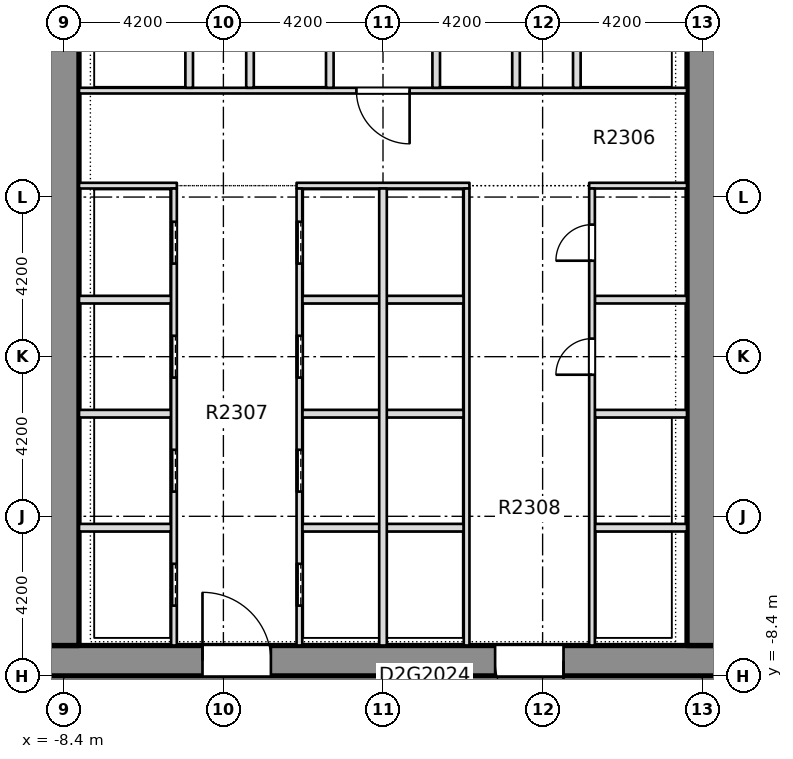
"""IFC4 building model, lengths in metres.
Left out: names, types, materials, properties, quantities, classifications, styles, units other than length and angle.
Written with IfcOpenShell. Run it as: python <this file> out.ifc"""

import sys

from ifc_helpers import new_model, si_unit, direction, frame, frame_2d, origin, place, context, subcontext, project, spatial, rectangle, extrude, element, fill, save


model = new_model("IFC4")
c1 = context("Model", 3, precision=1e-05, world=origin(), true_north=direction((0.0, 1.0)))
c2 = subcontext(c1, "Body", "Model", "MODEL_VIEW")
j1 = project(units=[si_unit("LENGTHUNIT", "METRE"), si_unit("PLANEANGLEUNIT", "RADIAN")], contexts=[c1])
p1 = place(None, origin())
s1 = spatial("IfcSite", under=j1, at=p1, CompositionType="ELEMENT")
p2 = place(p1, origin())
s2 = spatial("IfcBuilding", under=s1, at=p2, CompositionType="ELEMENT")
p3 = place(p2, frame((0.0, 0.0, 94.2)))
s3 = spatial("IfcBuildingStorey", under=s2, at=p3, CompositionType="ELEMENT", Elevation=94.2)
p4 = place(p3, frame((-11.8, -8.0, -0.32), z_axis=(0.0, 0.0, 1.0), x_axis=(1.0, 0.0, 0.0)))
e1 = element("IfcWall", 1, at=p4, inside=s3, PredefinedType="SHEAR", context=c2, shape_type="SweptSolid", body=[
    extrude(rectangle(XDim=23.6, YDim=0.8, at=frame_2d((11.8, 0.0))), origin(), (0.0, 0.0, 1.0), 3.45),
])
p5 = place(p4, frame((7.05, 0.0, 0.32)))
e2 = element("IfcOpeningElement", 2, at=p5, cuts=e1, PredefinedType="OPENING", context=c2, shape_type="SweptSolid", body=[
    extrude(rectangle(XDim=1.8, YDim=2.1, at=frame_2d((0.9, 1.05))), frame((0.0, 0.41, 0.0), z_axis=(0.0, -1.0, 0.0), x_axis=(1.0, 0.0, 0.0)), (0.0, 0.0, 1.0), 0.82),
])
p6 = place(p4, frame((14.75, 0.0, 0.32)))
e3 = element("IfcOpeningElement", 3, at=p6, cuts=e1, PredefinedType="OPENING", context=c2, shape_type="SweptSolid", body=[
    extrude(rectangle(XDim=1.8, YDim=2.1, at=frame_2d((0.9, 1.05))), frame((0.0, 0.41, 0.0), z_axis=(0.0, -1.0, 0.0), x_axis=(1.0, 0.0, 0.0)), (0.0, 0.0, 1.0), 0.82),
])
p7 = place(p3, frame((-8.4, -7.6, -0.32), z_axis=(0.0, 0.0, 1.0), x_axis=(0.0, 1.0, 0.0)))
e4 = element("IfcWall", 4, at=p7, inside=s3, PredefinedType="SHEAR", context=c2, shape_type="SweptSolid", body=[
    extrude(rectangle(XDim=28.55, YDim=0.8, at=frame_2d((14.275, 0.0))), origin(), (0.0, 0.0, 1.0), 3.45),
])
p8 = place(p7, frame((18.5, 0.0, 0.32)))
e5 = element("IfcOpeningElement", 5, at=p8, cuts=e4, PredefinedType="OPENING", context=c2, shape_type="SweptSolid", body=[
    extrude(rectangle(XDim=1.2, YDim=2.1, at=frame_2d((0.6, 1.05))), frame((0.0, 0.41, 0.0), z_axis=(0.0, -1.0, 0.0), x_axis=(1.0, 0.0, 0.0)), (0.0, 0.0, 1.0), 0.82),
])
p9 = place(p3, frame((8.4, -7.6, -0.32), z_axis=(0.0, 0.0, 1.0), x_axis=(0.0, 1.0, 0.0)))
e6 = element("IfcWall", 6, at=p9, inside=s3, PredefinedType="SHEAR", context=c2, shape_type="SweptSolid", body=[
    extrude(rectangle(XDim=28.55, YDim=0.8, at=frame_2d((14.275, 0.0))), origin(), (0.0, 0.0, 1.0), 3.45),
])
p10 = place(p9, frame((18.5, 0.0, 0.32)))
e7 = element("IfcOpeningElement", 7, at=p10, cuts=e6, PredefinedType="OPENING", context=c2, shape_type="SweptSolid", body=[
    extrude(rectangle(XDim=1.2, YDim=2.1, at=frame_2d((0.6, 1.05))), frame((0.0, 0.41, 0.0), z_axis=(0.0, -1.0, 0.0), x_axis=(1.0, 0.0, 0.0)), (0.0, 0.0, 1.0), 0.82),
])
p11 = place(p3, frame((-7.999, -4.5, 0.0), z_axis=(0.0, 0.0, 1.0), x_axis=(1.0, 0.0, 0.0)))
e8 = element("IfcWall", 8, at=p11, inside=s3, PredefinedType="PARTITIONING", context=c2, shape_type="SweptSolid", body=[
    extrude(rectangle(XDim=2.424, YDim=0.2, at=frame_2d((1.212, 0.0))), origin(), (0.0, 0.0, 1.0), 3.13),
])
p12 = place(p3, frame((-2.125, -4.5, 0.0), z_axis=(0.0, 0.0, 1.0), x_axis=(1.0, 0.0, 0.0)))
e9 = element("IfcWall", 9, at=p12, inside=s3, PredefinedType="PARTITIONING", context=c2, shape_type="SweptSolid", body=[
    extrude(rectangle(XDim=4.25, YDim=0.2, at=frame_2d((2.125, 0.0))), origin(), (0.0, 0.0, 1.0), 3.13),
])
for number, where, z_axis, x_axis in (
    (10, (5.575, -4.5, 0.0), (0.0, 0.0, 1.0), (1.0, 0.0, 0.0)),
    (11, (-7.999, -1.5, 0.0), (0.0, 0.0, 1.0), (1.0, 0.0, 0.0)),
):
    element("IfcWall", number, at=place(p3, frame(where, z_axis=z_axis, x_axis=x_axis)), inside=s3, PredefinedType="PARTITIONING", context=c2, shape_type="SweptSolid", body=[
        extrude(rectangle(XDim=2.424, YDim=0.2, at=frame_2d((1.212, 0.0))), origin(), (0.0, 0.0, 1.0), 3.13),
    ])
p13 = place(p3, frame((-2.125, -1.5, 0.0), z_axis=(0.0, 0.0, 1.0), x_axis=(1.0, 0.0, 0.0)))
e12 = element("IfcWall", 12, at=p13, inside=s3, PredefinedType="PARTITIONING", context=c2, shape_type="SweptSolid", body=[
    extrude(rectangle(XDim=4.25, YDim=0.2, at=frame_2d((2.125, 0.0))), origin(), (0.0, 0.0, 1.0), 3.13),
])
for number, where, z_axis, x_axis in (
    (13, (5.575, -1.5, 0.0), (0.0, 0.0, 1.0), (1.0, 0.0, 0.0)),
    (14, (-7.999, 1.5, 0.0), (0.0, 0.0, 1.0), (1.0, 0.0, 0.0)),
):
    element("IfcWall", number, at=place(p3, frame(where, z_axis=z_axis, x_axis=x_axis)), inside=s3, PredefinedType="PARTITIONING", context=c2, shape_type="SweptSolid", body=[
        extrude(rectangle(XDim=2.424, YDim=0.2, at=frame_2d((1.212, 0.0))), origin(), (0.0, 0.0, 1.0), 3.13),
    ])
p14 = place(p3, frame((-2.125, 1.5, 0.0), z_axis=(0.0, 0.0, 1.0), x_axis=(1.0, 0.0, 0.0)))
e15 = element("IfcWall", 15, at=p14, inside=s3, PredefinedType="PARTITIONING", context=c2, shape_type="SweptSolid", body=[
    extrude(rectangle(XDim=4.25, YDim=0.2, at=frame_2d((2.125, 0.0))), origin(), (0.0, 0.0, 1.0), 3.13),
])
p15 = place(p3, frame((5.575, 1.5, 0.0), z_axis=(0.0, 0.0, 1.0), x_axis=(1.0, 0.0, 0.0)))
e16 = element("IfcWall", 16, at=p15, inside=s3, PredefinedType="PARTITIONING", context=c2, shape_type="SweptSolid", body=[
    extrude(rectangle(XDim=2.424, YDim=0.2, at=frame_2d((1.212, 0.0))), origin(), (0.0, 0.0, 1.0), 3.13),
])
p16 = place(p3, frame((-7.999, 4.5, 0.0), z_axis=(0.0, 0.0, 1.0), x_axis=(1.0, 0.0, 0.0)))
e17 = element("IfcWall", 17, at=p16, inside=s3, PredefinedType="PARTITIONING", context=c2, shape_type="SweptSolid", body=[
    extrude(rectangle(XDim=2.574, YDim=0.15, at=frame_2d((1.287, 0.0))), origin(), (0.0, 0.0, 1.0), 3.13),
])
p17 = place(p3, frame((-2.275, 4.5, 0.0), z_axis=(0.0, 0.0, 1.0), x_axis=(1.0, 0.0, 0.0)))
e18 = element("IfcWall", 18, at=p17, inside=s3, PredefinedType="PARTITIONING", context=c2, shape_type="SweptSolid", body=[
    extrude(rectangle(XDim=4.55, YDim=0.15, at=frame_2d((2.275, 0.0))), origin(), (0.0, 0.0, 1.0), 3.13),
])
p18 = place(p3, frame((5.425, 4.5, 0.0), z_axis=(0.0, 0.0, 1.0), x_axis=(1.0, 0.0, 0.0)))
e19 = element("IfcWall", 19, at=p18, inside=s3, PredefinedType="PARTITIONING", context=c2, shape_type="SweptSolid", body=[
    extrude(rectangle(XDim=2.574, YDim=0.15, at=frame_2d((1.287, 0.0))), origin(), (0.0, 0.0, 1.0), 3.13),
])
p19 = place(p3, frame((-7.999, 7.0, 0.0), z_axis=(0.0, 0.0, 1.0), x_axis=(1.0, 0.0, 0.0)))
e20 = element("IfcWall", 20, at=p19, inside=s3, PredefinedType="PARTITIONING", context=c2, shape_type="SweptSolid", body=[
    extrude(rectangle(XDim=15.998, YDim=0.15, at=frame_2d((7.999, 0.0))), origin(), (0.0, 0.0, 1.0), 3.13),
])
p20 = place(p19, frame((7.299, 0.0, 0.0)))
e21 = element("IfcOpeningElement", 21, at=p20, cuts=e20, PredefinedType="OPENING", context=c2, shape_type="SweptSolid", body=[
    extrude(rectangle(XDim=1.4, YDim=2.1, at=frame_2d((0.7, 1.05))), frame((0.0, 0.085, 0.0), z_axis=(0.0, -1.0, 0.0), x_axis=(1.0, 0.0, 0.0)), (0.0, 0.0, 1.0), 0.17),
])
p21 = place(p3, frame((-5.5, -7.599, 0.0), z_axis=(0.0, 0.0, 1.0), x_axis=(0.0, 1.0, 0.0)))
e22 = element("IfcWall", 22, at=p21, inside=s3, PredefinedType="PARTITIONING", context=c2, shape_type="SweptSolid", body=[
    extrude(rectangle(XDim=12.024, YDim=0.15, at=frame_2d((6.012, 0.0))), origin(), (0.0, 0.0, 1.0), 3.13),
])
p22 = place(p21, frame((1.049, 0.0, 0.0)))
e23 = element("IfcOpeningElement", 23, at=p22, cuts=e22, PredefinedType="OPENING", context=c2, shape_type="SweptSolid", body=[
    extrude(rectangle(XDim=1.1, YDim=2.1, at=frame_2d((0.55, 1.05))), frame((0.0, 0.085, 0.0), z_axis=(0.0, -1.0, 0.0), x_axis=(1.0, 0.0, 0.0)), (0.0, 0.0, 1.0), 0.17),
])
p23 = place(p21, frame((4.049, 0.0, 0.0)))
e24 = element("IfcOpeningElement", 24, at=p23, cuts=e22, PredefinedType="OPENING", context=c2, shape_type="SweptSolid", body=[
    extrude(rectangle(XDim=1.1, YDim=2.1, at=frame_2d((0.55, 1.05))), frame((0.0, 0.085, 0.0), z_axis=(0.0, -1.0, 0.0), x_axis=(1.0, 0.0, 0.0)), (0.0, 0.0, 1.0), 0.17),
])
p24 = place(p21, frame((7.049, 0.0, 0.0)))
e25 = element("IfcOpeningElement", 25, at=p24, cuts=e22, PredefinedType="OPENING", context=c2, shape_type="SweptSolid", body=[
    extrude(rectangle(XDim=1.1, YDim=2.1, at=frame_2d((0.55, 1.05))), frame((0.0, 0.085, 0.0), z_axis=(0.0, -1.0, 0.0), x_axis=(1.0, 0.0, 0.0)), (0.0, 0.0, 1.0), 0.17),
])
p25 = place(p21, frame((10.049, 0.0, 0.0)))
e26 = element("IfcOpeningElement", 26, at=p25, cuts=e22, PredefinedType="OPENING", context=c2, shape_type="SweptSolid", body=[
    extrude(rectangle(XDim=1.1, YDim=2.1, at=frame_2d((0.55, 1.05))), frame((0.0, 0.085, 0.0), z_axis=(0.0, -1.0, 0.0), x_axis=(1.0, 0.0, 0.0)), (0.0, 0.0, 1.0), 0.17),
])
p26 = place(p3, frame((-5.1, 7.075, 0.0), z_axis=(0.0, 0.0, 1.0), x_axis=(0.0, 1.0, 0.0)))
e27 = element("IfcWall", 27, at=p26, inside=s3, PredefinedType="PARTITIONING", context=c2, shape_type="SweptSolid", body=[
    extrude(rectangle(XDim=2.725, YDim=0.2, at=frame_2d((1.363, 0.0))), origin(), (0.0, 0.0, 1.0), 3.13),
])
p27 = place(p3, frame((-3.5, 7.075, 0.0), z_axis=(0.0, 0.0, 1.0), x_axis=(0.0, 1.0, 0.0)))
e28 = element("IfcWall", 28, at=p27, inside=s3, PredefinedType="PARTITIONING", context=c2, shape_type="SweptSolid", body=[
    extrude(rectangle(XDim=2.85, YDim=0.2, at=frame_2d((1.425, 0.0))), origin(), (0.0, 0.0, 1.0), 3.13),
])
p28 = place(p3, frame((-2.2, -7.599, 0.0), z_axis=(0.0, 0.0, 1.0), x_axis=(0.0, 1.0, 0.0)))
e29 = element("IfcWall", 29, at=p28, inside=s3, PredefinedType="PARTITIONING", context=c2, shape_type="SweptSolid", body=[
    extrude(rectangle(XDim=12.024, YDim=0.15, at=frame_2d((6.012, 0.0))), origin(), (0.0, 0.0, 1.0), 3.13),
])
p29 = place(p28, frame((1.049, 0.0, 0.0)))
e30 = element("IfcOpeningElement", 30, at=p29, cuts=e29, PredefinedType="OPENING", context=c2, shape_type="SweptSolid", body=[
    extrude(rectangle(XDim=1.1, YDim=2.1, at=frame_2d((0.55, 1.05))), frame((0.0, 0.085, 0.0), z_axis=(0.0, -1.0, 0.0), x_axis=(1.0, 0.0, 0.0)), (0.0, 0.0, 1.0), 0.17),
])
p30 = place(p28, frame((4.049, 0.0, 0.0)))
e31 = element("IfcOpeningElement", 31, at=p30, cuts=e29, PredefinedType="OPENING", context=c2, shape_type="SweptSolid", body=[
    extrude(rectangle(XDim=1.1, YDim=2.1, at=frame_2d((0.55, 1.05))), frame((0.0, 0.085, 0.0), z_axis=(0.0, -1.0, 0.0), x_axis=(1.0, 0.0, 0.0)), (0.0, 0.0, 1.0), 0.17),
])
p31 = place(p28, frame((7.049, 0.0, 0.0)))
e32 = element("IfcOpeningElement", 32, at=p31, cuts=e29, PredefinedType="OPENING", context=c2, shape_type="SweptSolid", body=[
    extrude(rectangle(XDim=1.1, YDim=2.1, at=frame_2d((0.55, 1.05))), frame((0.0, 0.085, 0.0), z_axis=(0.0, -1.0, 0.0), x_axis=(1.0, 0.0, 0.0)), (0.0, 0.0, 1.0), 0.17),
])
p32 = place(p28, frame((10.049, 0.0, 0.0)))
e33 = element("IfcOpeningElement", 33, at=p32, cuts=e29, PredefinedType="OPENING", context=c2, shape_type="SweptSolid", body=[
    extrude(rectangle(XDim=1.1, YDim=2.1, at=frame_2d((0.55, 1.05))), frame((0.0, 0.085, 0.0), z_axis=(0.0, -1.0, 0.0), x_axis=(1.0, 0.0, 0.0)), (0.0, 0.0, 1.0), 0.17),
])
p33 = place(p3, frame((-1.4, 7.075, 0.0), z_axis=(0.0, 0.0, 1.0), x_axis=(0.0, 1.0, 0.0)))
e34 = element("IfcWall", 34, at=p33, inside=s3, PredefinedType="PARTITIONING", context=c2, shape_type="SweptSolid", body=[
    extrude(rectangle(XDim=2.85, YDim=0.2, at=frame_2d((1.425, 0.0))), origin(), (0.0, 0.0, 1.0), 3.13),
])
p34 = place(p3, frame((0.0, -7.599, 0.0), z_axis=(0.0, 0.0, 1.0), x_axis=(0.0, 1.0, 0.0)))
e35 = element("IfcWall", 35, at=p34, inside=s3, PredefinedType="PARTITIONING", context=c2, shape_type="SweptSolid", body=[
    extrude(rectangle(XDim=12.024, YDim=0.2, at=frame_2d((6.012, 0.0))), origin(), (0.0, 0.0, 1.0), 3.13),
])
p35 = place(p3, frame((1.4, 7.075, 0.0), z_axis=(0.0, 0.0, 1.0), x_axis=(0.0, 1.0, 0.0)))
e36 = element("IfcWall", 36, at=p35, inside=s3, PredefinedType="PARTITIONING", context=c2, shape_type="SweptSolid", body=[
    extrude(rectangle(XDim=2.85, YDim=0.2, at=frame_2d((1.425, 0.0))), origin(), (0.0, 0.0, 1.0), 3.13),
])
p36 = place(p3, frame((2.2, -7.599, 0.0), z_axis=(0.0, 0.0, 1.0), x_axis=(0.0, 1.0, 0.0)))
e37 = element("IfcWall", 37, at=p36, inside=s3, PredefinedType="PARTITIONING", context=c2, shape_type="SweptSolid", body=[
    extrude(rectangle(XDim=12.024, YDim=0.15, at=frame_2d((6.012, 0.0))), origin(), (0.0, 0.0, 1.0), 3.13),
])
p37 = place(p3, frame((3.5, 7.075, 0.0), z_axis=(0.0, 0.0, 1.0), x_axis=(0.0, 1.0, 0.0)))
e38 = element("IfcWall", 38, at=p37, inside=s3, PredefinedType="PARTITIONING", context=c2, shape_type="SweptSolid", body=[
    extrude(rectangle(XDim=2.85, YDim=0.2, at=frame_2d((1.425, 0.0))), origin(), (0.0, 0.0, 1.0), 3.13),
])
p38 = place(p3, frame((5.1, 7.075, 0.0), z_axis=(0.0, 0.0, 1.0), x_axis=(0.0, 1.0, 0.0)))
e39 = element("IfcWall", 39, at=p38, inside=s3, PredefinedType="PARTITIONING", context=c2, shape_type="SweptSolid", body=[
    extrude(rectangle(XDim=2.725, YDim=0.2, at=frame_2d((1.363, 0.0))), origin(), (0.0, 0.0, 1.0), 3.13),
])
p39 = place(p3, frame((5.5, -7.599, 0.0), z_axis=(0.0, 0.0, 1.0), x_axis=(0.0, 1.0, 0.0)))
e40 = element("IfcWall", 40, at=p39, inside=s3, PredefinedType="PARTITIONING", context=c2, shape_type="SweptSolid", body=[
    extrude(rectangle(XDim=12.024, YDim=0.15, at=frame_2d((6.012, 0.0))), origin(), (0.0, 0.0, 1.0), 3.13),
])
p40 = place(p39, frame((7.124, 0.0, 0.0)))
e41 = element("IfcOpeningElement", 41, at=p40, cuts=e40, PredefinedType="OPENING", context=c2, shape_type="SweptSolid", body=[
    extrude(rectangle(XDim=0.95, YDim=2.1, at=frame_2d((0.475, 1.05))), frame((0.0, 0.085, 0.0), z_axis=(0.0, -1.0, 0.0), x_axis=(1.0, 0.0, 0.0)), (0.0, 0.0, 1.0), 0.17),
])
p41 = place(p39, frame((10.124, 0.0, 0.0)))
e42 = element("IfcOpeningElement", 42, at=p41, cuts=e40, PredefinedType="OPENING", context=c2, shape_type="SweptSolid", body=[
    extrude(rectangle(XDim=0.95, YDim=2.1, at=frame_2d((0.475, 1.05))), frame((0.0, 0.085, 0.0), z_axis=(0.0, -1.0, 0.0), x_axis=(1.0, 0.0, 0.0)), (0.0, 0.0, 1.0), 0.17),
])
p42 = place(p22, origin())
e43 = element("IfcDoor", 43, at=p42, inside=s3, OperationType="SLIDING_TO_LEFT", PredefinedType="DOOR", context=c2, shape_type="SweptSolid", body=[
    extrude(rectangle(XDim=1.1, YDim=2.1, at=frame_2d((0.55, 1.05))), frame((0.0, 0.025, 0.0), z_axis=(0.0, -1.0, 0.0), x_axis=(1.0, 0.0, 0.0)), (0.0, 0.0, 1.0), 0.05),
])
fill(e23, e43)
p43 = place(p23, origin())
e44 = element("IfcDoor", 44, at=p43, inside=s3, OperationType="SLIDING_TO_LEFT", PredefinedType="DOOR", context=c2, shape_type="SweptSolid", body=[
    extrude(rectangle(XDim=1.1, YDim=2.1, at=frame_2d((0.55, 1.05))), frame((0.0, 0.025, 0.0), z_axis=(0.0, -1.0, 0.0), x_axis=(1.0, 0.0, 0.0)), (0.0, 0.0, 1.0), 0.05),
])
fill(e24, e44)
p44 = place(p24, origin())
e45 = element("IfcDoor", 45, at=p44, inside=s3, OperationType="SLIDING_TO_LEFT", PredefinedType="DOOR", context=c2, shape_type="SweptSolid", body=[
    extrude(rectangle(XDim=1.1, YDim=2.1, at=frame_2d((0.55, 1.05))), frame((0.0, 0.025, 0.0), z_axis=(0.0, -1.0, 0.0), x_axis=(1.0, 0.0, 0.0)), (0.0, 0.0, 1.0), 0.05),
])
fill(e25, e45)
p45 = place(p25, origin())
e46 = element("IfcDoor", 46, at=p45, inside=s3, OperationType="SLIDING_TO_LEFT", PredefinedType="DOOR", context=c2, shape_type="SweptSolid", body=[
    extrude(rectangle(XDim=1.1, YDim=2.1, at=frame_2d((0.55, 1.05))), frame((0.0, 0.025, 0.0), z_axis=(0.0, -1.0, 0.0), x_axis=(1.0, 0.0, 0.0)), (0.0, 0.0, 1.0), 0.05),
])
fill(e26, e46)
p46 = place(p29, origin())
e47 = element("IfcDoor", 47, at=p46, inside=s3, OperationType="SLIDING_TO_LEFT", PredefinedType="DOOR", context=c2, shape_type="SweptSolid", body=[
    extrude(rectangle(XDim=1.1, YDim=2.1, at=frame_2d((0.55, 1.05))), frame((0.0, 0.025, 0.0), z_axis=(0.0, -1.0, 0.0), x_axis=(1.0, 0.0, 0.0)), (0.0, 0.0, 1.0), 0.05),
])
fill(e30, e47)
p47 = place(p30, origin())
e48 = element("IfcDoor", 48, at=p47, inside=s3, OperationType="SLIDING_TO_LEFT", PredefinedType="DOOR", context=c2, shape_type="SweptSolid", body=[
    extrude(rectangle(XDim=1.1, YDim=2.1, at=frame_2d((0.55, 1.05))), frame((0.0, 0.025, 0.0), z_axis=(0.0, -1.0, 0.0), x_axis=(1.0, 0.0, 0.0)), (0.0, 0.0, 1.0), 0.05),
])
fill(e31, e48)
p48 = place(p31, origin())
e49 = element("IfcDoor", 49, at=p48, inside=s3, OperationType="SLIDING_TO_LEFT", PredefinedType="DOOR", context=c2, shape_type="SweptSolid", body=[
    extrude(rectangle(XDim=1.1, YDim=2.1, at=frame_2d((0.55, 1.05))), frame((0.0, 0.025, 0.0), z_axis=(0.0, -1.0, 0.0), x_axis=(1.0, 0.0, 0.0)), (0.0, 0.0, 1.0), 0.05),
])
fill(e32, e49)
p49 = place(p32, origin())
e50 = element("IfcDoor", 50, at=p49, inside=s3, OperationType="SLIDING_TO_LEFT", PredefinedType="DOOR", context=c2, shape_type="SweptSolid", body=[
    extrude(rectangle(XDim=1.1, YDim=2.1, at=frame_2d((0.55, 1.05))), frame((0.0, 0.025, 0.0), z_axis=(0.0, -1.0, 0.0), x_axis=(1.0, 0.0, 0.0)), (0.0, 0.0, 1.0), 0.05),
])
fill(e33, e50)
p50 = place(p40, origin())
e51 = element("IfcDoor", 51, at=p50, inside=s3, OperationType="SINGLE_SWING_RIGHT", PredefinedType="DOOR", context=c2, shape_type="SweptSolid", body=[
    extrude(rectangle(XDim=0.95, YDim=2.1, at=frame_2d((0.475, 1.05))), frame((0.0, 0.025, 0.0), z_axis=(0.0, -1.0, 0.0), x_axis=(1.0, 0.0, 0.0)), (0.0, 0.0, 1.0), 0.05),
])
fill(e41, e51)
p51 = place(p41, origin())
e52 = element("IfcDoor", 52, at=p51, inside=s3, OperationType="SINGLE_SWING_RIGHT", PredefinedType="DOOR", context=c2, shape_type="SweptSolid", body=[
    extrude(rectangle(XDim=0.95, YDim=2.1, at=frame_2d((0.475, 1.05))), frame((0.0, 0.025, 0.0), z_axis=(0.0, -1.0, 0.0), x_axis=(1.0, 0.0, 0.0)), (0.0, 0.0, 1.0), 0.05),
])
fill(e42, e52)
p52 = place(p20, origin())
e53 = element("IfcDoor", 53, at=p52, inside=s3, OperationType="SINGLE_SWING_RIGHT", PredefinedType="DOOR", context=c2, shape_type="SweptSolid", body=[
    extrude(rectangle(XDim=1.4, YDim=2.1, at=frame_2d((0.7, 1.05))), frame((0.0, 0.025, 0.0), z_axis=(0.0, -1.0, 0.0), x_axis=(1.0, 0.0, 0.0)), (0.0, 0.0, 1.0), 0.05),
])
fill(e21, e53)
p53 = place(p5, origin())
e54 = element("IfcDoor", 54, at=p53, inside=s3, OperationType="SINGLE_SWING_LEFT", PredefinedType="DOOR", context=c2, shape_type="SweptSolid", body=[
    extrude(rectangle(XDim=1.8, YDim=2.1, at=frame_2d((0.9, 1.05))), frame((0.0, 0.025, 0.0), z_axis=(0.0, -1.0, 0.0), x_axis=(1.0, 0.0, 0.0)), (0.0, 0.0, 1.0), 0.05),
])
fill(e2, e54)
p54 = place(p6, origin())
e55 = element("IfcDoor", 55, at=p54, inside=s3, OperationType="SINGLE_SWING_LEFT", PredefinedType="DOOR", context=c2, shape_type="SweptSolid", body=[
    extrude(rectangle(XDim=1.8, YDim=2.1, at=frame_2d((0.9, 1.05))), frame((0.0, 0.025, 0.0), z_axis=(0.0, -1.0, 0.0), x_axis=(1.0, 0.0, 0.0)), (0.0, 0.0, 1.0), 0.05),
])
fill(e3, e55)
save(model, sys.argv[1])
